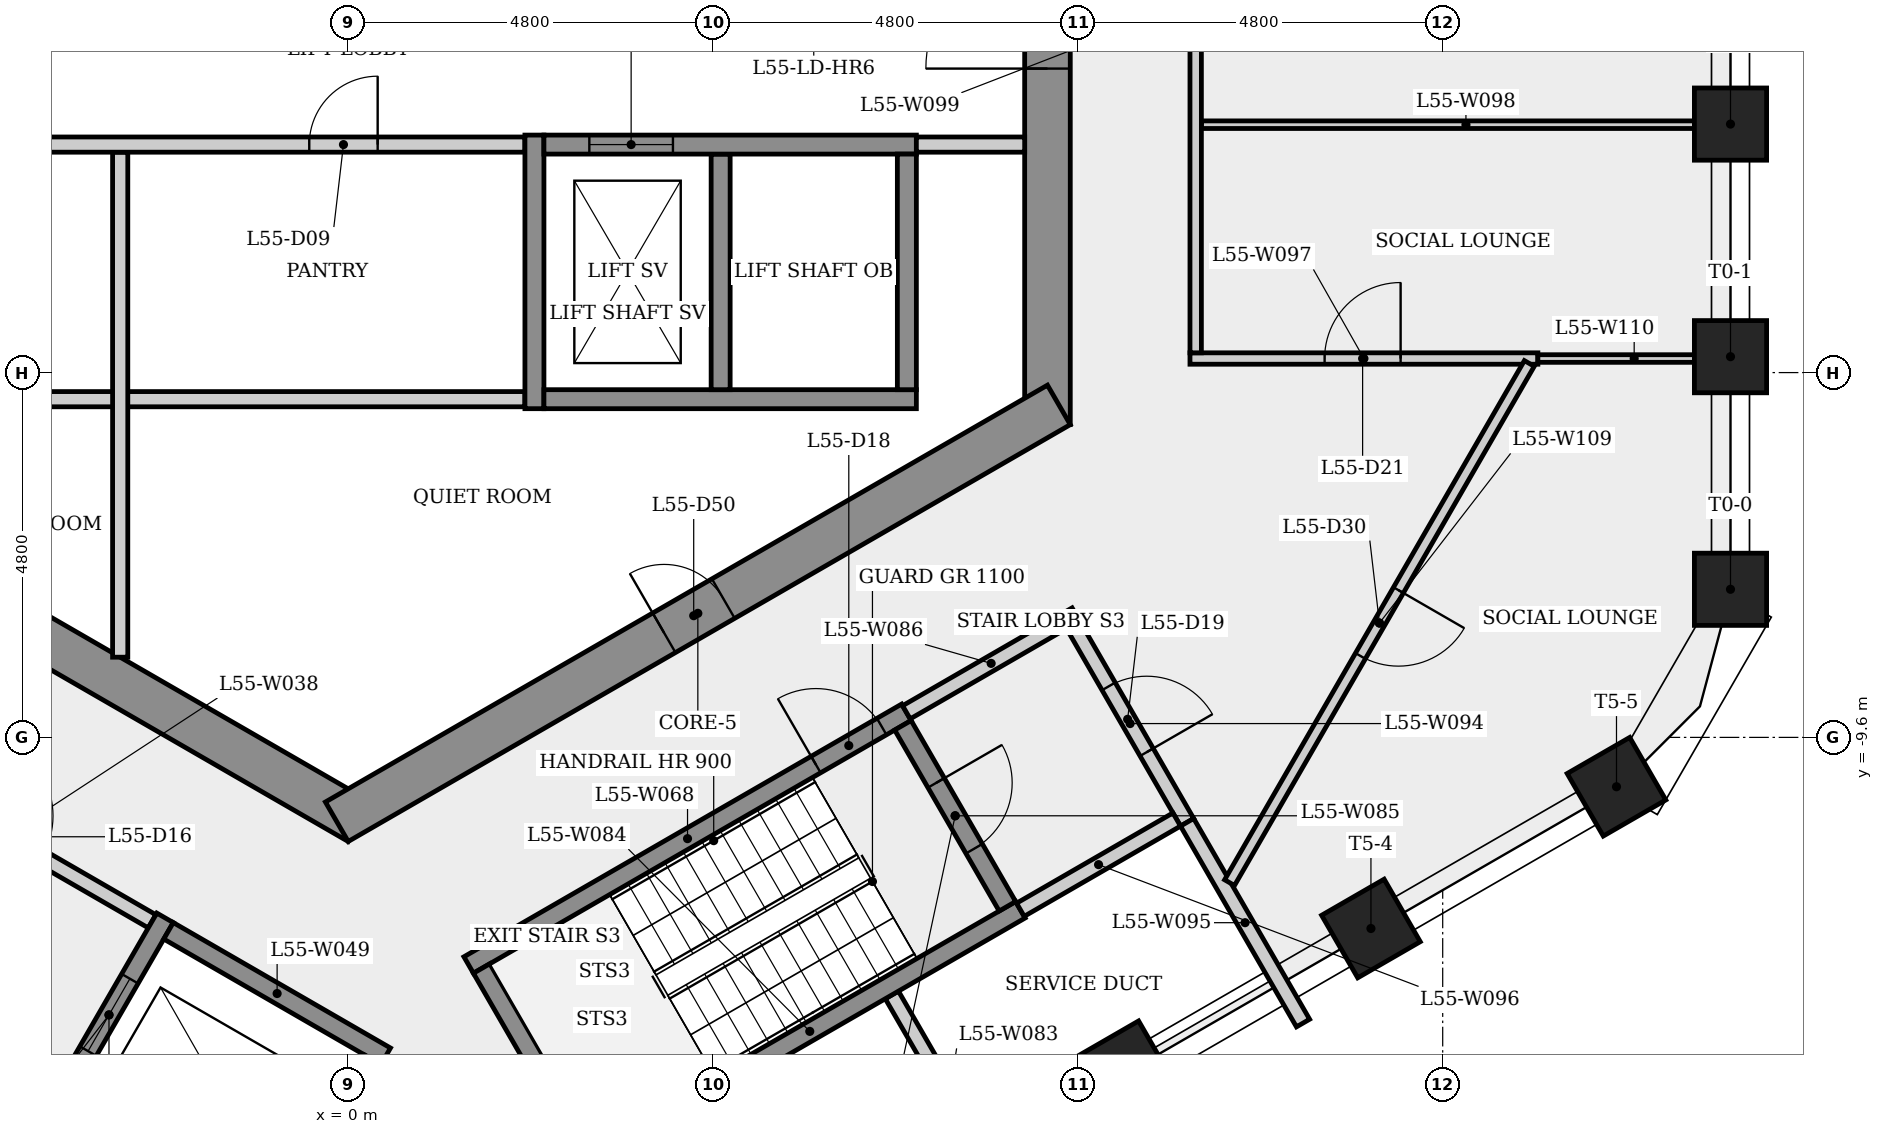
"""IFC4 building model, lengths in metres.
Left out: names, types, materials, properties, quantities, classifications, styles, units other than length and angle.
Written with IfcOpenShell. Run it as: python <this file> out.ifc"""

import sys

from ifc_helpers import new_model, si_unit, direction, frame, frame_2d, origin, origin_2d, place, context, subcontext, project, spatial, rectangle, extrude, element, fill, save


model = new_model("IFC4")
c1 = context("Model", 3, precision=1e-05, world=origin(), true_north=direction((0.0, 1.0)))
c2 = subcontext(c1, "Body", "Model", "MODEL_VIEW")
j1 = project(units=[si_unit("LENGTHUNIT", "METRE"), si_unit("PLANEANGLEUNIT", "RADIAN")], contexts=[c1])
p1 = place(None, origin())
s1 = spatial("IfcSite", under=j1, at=p1, CompositionType="ELEMENT")
p2 = place(p1, origin())
s2 = spatial("IfcBuilding", under=s1, at=p2, CompositionType="ELEMENT")
p3 = place(p2, frame((0.0, 0.0, 206.1)))
s3 = spatial("IfcBuildingStorey", under=s2, at=p3, CompositionType="ELEMENT", Elevation=206.1)
p4 = place(p3, frame((9.2, -5.485, 0.0), z_axis=(0.0, 0.0, 1.0), x_axis=(0.0, 1.0, 0.0)))
e1 = element("IfcWall", 1, at=p4, inside=s3, PredefinedType="SHEAR", context=c2, shape_type="SweptSolid", body=[
    extrude(rectangle(XDim=10.97, YDim=0.6, at=frame_2d((5.485, 0.0))), origin(), (0.0, 0.0, 1.0), 4.0),
])
p5 = place(p4, frame((4.685, 0.0, 0.0)))
e2 = element("IfcOpeningElement", 2, at=p5, cuts=e1, PredefinedType="OPENING", context=c2, shape_type="SweptSolid", body=[
    extrude(rectangle(XDim=1.6, YDim=2.1, at=frame_2d((0.8, 1.05))), frame((0.0, 0.31, 0.0), z_axis=(0.0, -1.0, 0.0), x_axis=(1.0, 0.0, 0.0)), (0.0, 0.0, 1.0), 0.62),
])
p6 = place(p3, frame((-9.35, -5.225, 0.0), z_axis=(0.0, 0.0, 1.0), x_axis=(0.866023993627, -0.500002442456, 0.0)))
e3 = element("IfcWall", 3, at=p6, inside=s3, PredefinedType="SHEAR", context=c2, shape_type="SweptSolid", body=[
    extrude(rectangle(XDim=10.97, YDim=0.6, at=frame_2d((5.485, 0.0))), origin(), (0.0, 0.0, 1.0), 4.0),
])
p7 = place(p6, frame((3.315, 0.0, 0.0)))
e4 = element("IfcOpeningElement", 4, at=p7, cuts=e3, PredefinedType="OPENING", context=c2, shape_type="SweptSolid", body=[
    extrude(rectangle(XDim=0.9, YDim=2.1, at=frame_2d((0.45, 1.05))), frame((0.0, 0.31, 0.0), z_axis=(0.0, -1.0, 0.0), x_axis=(1.0, 0.0, 0.0)), (0.0, 0.0, 1.0), 0.62),
])
p8 = place(p3, frame((-0.15, -10.71, 0.0), z_axis=(0.0, 0.0, 1.0), x_axis=(0.866023993627, 0.500002442456, 0.0)))
e5 = element("IfcWall", 5, at=p8, inside=s3, PredefinedType="SHEAR", context=c2, shape_type="SweptSolid", body=[
    extrude(rectangle(XDim=10.97, YDim=0.6, at=frame_2d((5.485, 0.0))), origin(), (0.0, 0.0, 1.0), 4.0),
])
p9 = place(p8, frame((4.972, 0.0, 0.0)))
e6 = element("IfcOpeningElement", 6, at=p9, cuts=e5, PredefinedType="OPENING", context=c2, shape_type="SweptSolid", body=[
    extrude(rectangle(XDim=0.9, YDim=2.1, at=frame_2d((0.45, 1.05))), frame((0.0, 0.31, 0.0), z_axis=(0.0, -1.0, 0.0), x_axis=(1.0, 0.0, 0.0)), (0.0, 0.0, 1.0), 0.62),
])
for number, where, z_axis, x_axis in (
    (7, (18.187, -7.651, 0.0), (0.0, 0.0, 1.0), (1.0, 0.0, 0.0)),
    (8, (18.187, -4.591, 0.0), (0.0, 0.0, 1.0), (1.0, 0.0, 0.0)),
    (9, (18.187, -1.53, 0.0), (0.0, 0.0, 1.0), (1.0, 0.0, 0.0)),
    (10, (10.225, -13.98, 0.0), (0.0, 0.0, 1.0), (0.5, -0.866, 0.0)),
    (11, (13.456, -12.115, 0.0), (0.0, 0.0, 1.0), (0.5, -0.866, 0.0)),
    (12, (16.687, -10.25, 0.0), (0.0, 0.0, 1.0), (0.5, -0.866, 0.0)),
):
    element("IfcColumn", number, at=place(p3, frame(where, z_axis=z_axis, x_axis=x_axis)), inside=s3, PredefinedType="COLUMN", context=c2, shape_type="SweptSolid", body=[
        extrude(rectangle(XDim=0.95, YDim=0.95, at=origin_2d()), origin(), (0.0, 0.0, 1.0), 4.0),
    ])
p10 = place(p3, frame((-8.88, -5.15, 0.0), z_axis=(0.0, 0.0, 1.0), x_axis=(1.0, 0.0, 0.0)))
e13 = element("IfcWall", 13, at=p10, inside=s3, PredefinedType="PARTITIONING", context=c2, shape_type="SweptSolid", body=[
    extrude(rectangle(XDim=11.205, YDim=0.2, at=frame_2d((5.603, 0.0))), origin(), (0.0, 0.0, 1.0), 3.6),
])
p11 = place(p3, frame((-6.435, -9.795, 0.0), z_axis=(0.0, 0.0, 1.0), x_axis=(0.866012907634, -0.500021643343, 0.0)))
e14 = element("IfcWall", 14, at=p11, inside=s3, PredefinedType="PARTITIONING", context=c2, shape_type="SweptSolid", body=[
    extrude(rectangle(XDim=4.45, YDim=0.2, at=frame_2d((2.225, 0.0))), origin(), (0.0, 0.0, 1.0), 3.6),
])
p12 = place(p11, frame((1.675, 0.0, 0.0)))
e15 = element("IfcOpeningElement", 15, at=p12, cuts=e14, PredefinedType="OPENING", context=c2, shape_type="SweptSolid", body=[
    extrude(rectangle(XDim=1.1, YDim=2.1, at=frame_2d((0.55, 1.05))), frame((0.0, 0.11, 0.0), z_axis=(0.0, -1.0, 0.0), x_axis=(1.0, 0.0, 0.0)), (0.0, 0.0, 1.0), 0.22),
])
p13 = place(p3, frame((-3.0, -8.545, 0.0), z_axis=(0.0, 0.0, 1.0), x_axis=(0.0, 1.0, 0.0)))
e16 = element("IfcWall", 16, at=p13, inside=s3, PredefinedType="PARTITIONING", context=c2, shape_type="SweptSolid", body=[
    extrude(rectangle(XDim=6.645, YDim=0.2, at=frame_2d((3.323, 0.0))), origin(), (0.0, 0.0, 1.0), 3.6),
])
p14 = place(p3, frame((-8.9, -1.8, 0.0), z_axis=(0.0, 0.0, 1.0), x_axis=(1.0, 0.0, 0.0)))
e17 = element("IfcWall", 17, at=p14, inside=s3, PredefinedType="PARTITIONING", context=c2, shape_type="SweptSolid", body=[
    extrude(rectangle(XDim=11.225, YDim=0.2, at=frame_2d((5.613, 0.0))), origin(), (0.0, 0.0, 1.0), 3.6),
])
p15 = place(p14, frame((2.485, 0.0, 0.0)))
e18 = element("IfcOpeningElement", 18, at=p15, cuts=e17, PredefinedType="OPENING", context=c2, shape_type="SweptSolid", body=[
    extrude(rectangle(XDim=0.9, YDim=2.1, at=frame_2d((0.45, 1.05))), frame((0.0, 0.11, 0.0), z_axis=(0.0, -1.0, 0.0), x_axis=(1.0, 0.0, 0.0)), (0.0, 0.0, 1.0), 0.22),
])
p16 = place(p14, frame((8.387, 0.0, 0.0)))
e19 = element("IfcOpeningElement", 19, at=p16, cuts=e17, PredefinedType="OPENING", context=c2, shape_type="SweptSolid", body=[
    extrude(rectangle(XDim=0.9, YDim=2.1, at=frame_2d((0.45, 1.05))), frame((0.0, 0.11, 0.0), z_axis=(0.0, -1.0, 0.0), x_axis=(1.0, 0.0, 0.0)), (0.0, 0.0, 1.0), 0.22),
])
p17 = place(p3, frame((-2.41, -11.974, 0.0), z_axis=(0.0, 0.0, 1.0), x_axis=(-0.500001826776, -0.866024349092, 0.0)))
e20 = element("IfcWall", 20, at=p17, inside=s3, PredefinedType="SHEAR", context=c2, shape_type="SweptSolid", body=[
    extrude(rectangle(XDim=2.95, YDim=0.25, at=frame_2d((1.475, 0.0))), origin(), (0.0, 0.0, 1.0), 3.6),
])
p18 = place(p17, frame((0.925, 0.0, 0.0)))
e21 = element("IfcOpeningElement", 21, at=p18, cuts=e20, PredefinedType="OPENING", context=c2, shape_type="SweptSolid", body=[
    extrude(rectangle(XDim=1.1, YDim=2.1, at=frame_2d((0.55, 1.05))), frame((0.0, 0.135, 0.0), z_axis=(0.0, -1.0, 0.0), x_axis=(1.0, 0.0, 0.0)), (0.0, 0.0, 1.0), 0.27),
])
p19 = place(p3, frame((-2.364, -12.145, 0.0), z_axis=(0.0, 0.0, 1.0), x_axis=(0.866040211805, -0.499974350878, 0.0)))
e22 = element("IfcWall", 22, at=p19, inside=s3, PredefinedType="SHEAR", context=c2, shape_type="SweptSolid", body=[
    extrude(rectangle(XDim=3.3, YDim=0.25, at=frame_2d((1.65, 0.0))), origin(), (0.0, 0.0, 1.0), 3.6),
])
p20 = place(p3, frame((1.585, -12.595, 0.0), z_axis=(0.0, 0.0, 1.0), x_axis=(0.866036417653, 0.499980922934, 0.0)))
e23 = element("IfcWall", 23, at=p20, inside=s3, PredefinedType="SHEAR", context=c2, shape_type="SweptSolid", body=[
    extrude(rectangle(XDim=6.65, YDim=0.25, at=frame_2d((3.325, 0.0))), origin(), (0.0, 0.0, 1.0), 3.6),
])
p21 = place(p20, frame((5.275, 0.0, 0.0)))
e24 = element("IfcOpeningElement", 24, at=p21, cuts=e23, PredefinedType="OPENING", context=c2, shape_type="SweptSolid", body=[
    extrude(rectangle(XDim=1.0, YDim=2.1, at=frame_2d((0.5, 1.05))), frame((0.0, 0.135, 0.0), z_axis=(0.0, -1.0, 0.0), x_axis=(1.0, 0.0, 0.0)), (0.0, 0.0, 1.0), 0.27),
])
p22 = place(p3, frame((2.45, -5.275, 0.0), z_axis=(0.0, 0.0, 1.0), x_axis=(0.0, 1.0, 0.0)))
e25 = element("IfcWall", 25, at=p22, inside=s3, PredefinedType="SHEAR", context=c2, shape_type="SweptSolid", body=[
    extrude(rectangle(XDim=3.6, YDim=0.25, at=frame_2d((1.8, 0.0))), origin(), (0.0, 0.0, 1.0), 3.6),
])
p23 = place(p3, frame((3.256, -15.239, 0.0), z_axis=(0.0, 0.0, 1.0), x_axis=(-0.50002537861, 0.866010750942, 0.0)))
e26 = element("IfcWall", 26, at=p23, inside=s3, PredefinedType="SHEAR", context=c2, shape_type="SweptSolid", body=[
    extrude(rectangle(XDim=3.0, YDim=0.25, at=frame_2d((1.5, 0.0))), origin(), (0.0, 0.0, 1.0), 3.6),
])
p24 = place(p3, frame((2.575, -5.15, 0.0), z_axis=(0.0, 0.0, 1.0), x_axis=(1.0, 0.0, 0.0)))
e27 = element("IfcWall", 27, at=p24, inside=s3, PredefinedType="SHEAR", context=c2, shape_type="SweptSolid", body=[
    extrude(rectangle(XDim=4.9, YDim=0.25, at=frame_2d((2.45, 0.0))), origin(), (0.0, 0.0, 1.0), 3.6),
])
p25 = place(p3, frame((4.9, -1.925, 0.0), z_axis=(0.0, 0.0, 1.0), x_axis=(0.0, -1.0, 0.0)))
e28 = element("IfcWall", 28, at=p25, inside=s3, PredefinedType="SHEAR", context=c2, shape_type="SweptSolid", body=[
    extrude(rectangle(XDim=3.1, YDim=0.25, at=frame_2d((1.55, 0.0))), origin(), (0.0, 0.0, 1.0), 4.0),
])
p26 = place(p3, frame((2.575, -1.8, 0.0), z_axis=(0.0, 0.0, 1.0), x_axis=(1.0, 0.0, 0.0)))
e29 = element("IfcWall", 29, at=p26, inside=s3, PredefinedType="SHEAR", context=c2, shape_type="SweptSolid", body=[
    extrude(rectangle(XDim=4.9, YDim=0.25, at=frame_2d((2.45, 0.0))), origin(), (0.0, 0.0, 1.0), 3.6),
])
p27 = place(p26, frame((0.597, 0.0, 0.0)))
e30 = element("IfcOpeningElement", 30, at=p27, cuts=e29, PredefinedType="OPENING", context=c2, shape_type="SweptSolid", body=[
    extrude(rectangle(XDim=1.1, YDim=2.1, at=frame_2d((0.55, 1.05))), frame((0.0, 0.135, 0.0), z_axis=(0.0, -1.0, 0.0), x_axis=(1.0, 0.0, 0.0)), (0.0, 0.0, 1.0), 0.27),
])
p28 = place(p3, frame((7.153, -12.989, 0.0), z_axis=(0.0, 0.0, 1.0), x_axis=(0.49999255039, -0.866029704776, 0.0)))
e31 = element("IfcWall", 31, at=p28, inside=s3, PredefinedType="PLUMBINGWALL", context=c2, shape_type="SweptSolid", body=[
    extrude(rectangle(XDim=3.025, YDim=0.2, at=frame_2d((1.513, 0.0))), origin(), (0.0, 0.0, 1.0), 3.6),
])
p29 = place(p3, frame((3.301, -15.068, 0.0), z_axis=(0.0, 0.0, 1.0), x_axis=(0.866035036182, 0.499983315828, 0.0)))
e32 = element("IfcWall", 32, at=p29, inside=s3, PredefinedType="SHEAR", context=c2, shape_type="SweptSolid", body=[
    extrude(rectangle(XDim=6.4, YDim=0.25, at=frame_2d((3.2, 0.0))), origin(), (0.0, 0.0, 1.0), 4.0),
])
p30 = place(p3, frame((7.298, -9.441, 0.0), z_axis=(0.0, 0.0, 1.0), x_axis=(0.500034990121, -0.866005201286, 0.0)))
e33 = element("IfcWall", 33, at=p30, inside=s3, PredefinedType="SHEAR", context=c2, shape_type="SweptSolid", body=[
    extrude(rectangle(XDim=2.75, YDim=0.25, at=frame_2d((1.375, 0.0))), origin(), (0.0, 0.0, 1.0), 3.6),
])
p31 = place(p30, frame((0.875, 0.0, 0.0)))
e34 = element("IfcOpeningElement", 34, at=p31, cuts=e33, PredefinedType="OPENING", context=c2, shape_type="SweptSolid", body=[
    extrude(rectangle(XDim=1.0, YDim=2.1, at=frame_2d((0.5, 1.05))), frame((0.0, 0.135, 0.0), z_axis=(0.0, -1.0, 0.0), x_axis=(1.0, 0.0, 0.0)), (0.0, 0.0, 1.0), 0.27),
])
p32 = place(p3, frame((7.344, -9.27, 0.0), z_axis=(0.0, 0.0, 1.0), x_axis=(0.866005588531, 0.500034319456, 0.0)))
e35 = element("IfcWall", 35, at=p32, inside=s3, PredefinedType="PARTITIONING", context=c2, shape_type="SweptSolid", body=[
    extrude(rectangle(XDim=2.575, YDim=0.2, at=frame_2d((1.288, 0.0))), origin(), (0.0, 0.0, 1.0), 3.6),
])
p33 = place(p3, frame((7.35, -1.925, 0.0), z_axis=(0.0, 0.0, 1.0), x_axis=(0.0, -1.0, 0.0)))
e36 = element("IfcWall", 36, at=p33, inside=s3, PredefinedType="SHEAR", context=c2, shape_type="SweptSolid", body=[
    extrude(rectangle(XDim=3.1, YDim=0.25, at=frame_2d((1.55, 0.0))), origin(), (0.0, 0.0, 1.0), 4.0),
])
p34 = place(p3, frame((8.9, -1.8, 0.0), z_axis=(0.0, 0.0, 1.0), x_axis=(-1.0, 0.0, 0.0)))
e37 = element("IfcWall", 37, at=p34, inside=s3, PredefinedType="PARTITIONING", context=c2, shape_type="SweptSolid", body=[
    extrude(rectangle(XDim=1.425, YDim=0.2, at=frame_2d((0.712, 0.0))), origin(), (0.0, 0.0, 1.0), 3.6),
])
p35 = place(p3, frame((9.537, -8.119, 0.0), z_axis=(0.0, 0.0, 1.0), x_axis=(0.499990139034, -0.866031096941, 0.0)))
e38 = element("IfcWall", 38, at=p35, inside=s3, PredefinedType="PARTITIONING", context=c2, shape_type="SweptSolid", body=[
    extrude(rectangle(XDim=3.0, YDim=0.2, at=frame_2d((1.5, 0.0))), origin(), (0.0, 0.0, 1.0), 3.6),
])
p36 = place(p35, frame((0.935, 0.0, 0.0)))
e39 = element("IfcOpeningElement", 39, at=p36, cuts=e38, PredefinedType="OPENING", context=c2, shape_type="SweptSolid", body=[
    extrude(rectangle(XDim=1.0, YDim=2.1, at=frame_2d((0.5, 1.05))), frame((0.0, 0.11, 0.0), z_axis=(0.0, -1.0, 0.0), x_axis=(1.0, 0.0, 0.0)), (0.0, 0.0, 1.0), 0.22),
])
p37 = place(p3, frame((11.037, -10.717, 0.0), z_axis=(0.0, 0.0, 1.0), x_axis=(0.500004207291, -0.86602297469, 0.0)))
e40 = element("IfcWall", 40, at=p37, inside=s3, PredefinedType="PLUMBINGWALL", context=c2, shape_type="SweptSolid", body=[
    extrude(rectangle(XDim=3.05, YDim=0.2, at=frame_2d((1.525, 0.0))), origin(), (0.0, 0.0, 1.0), 3.6),
])
p38 = place(p3, frame((10.901, -10.681, 0.0), z_axis=(0.0, 0.0, 1.0), x_axis=(-0.866007538022, -0.500030943131, 0.0)))
e41 = element("IfcWall", 41, at=p38, inside=s3, PredefinedType="PLUMBINGWALL", context=c2, shape_type="SweptSolid", body=[
    extrude(rectangle(XDim=2.375, YDim=0.2, at=frame_2d((1.188, 0.0))), origin(), (0.0, 0.0, 1.0), 3.6),
])
p39 = place(p3, frame((11.075, -4.615, 0.0), z_axis=(0.0, 0.0, 1.0), x_axis=(1.0, 0.0, 0.0)))
e42 = element("IfcWall", 42, at=p39, inside=s3, PredefinedType="PARTITIONING", context=c2, shape_type="SweptSolid", body=[
    extrude(rectangle(XDim=4.577, YDim=0.15, at=frame_2d((2.289, 0.0))), origin(), (0.0, 0.0, 1.0), 3.6),
])
p40 = place(p39, frame((1.771, 0.0, 0.0)))
e43 = element("IfcOpeningElement", 43, at=p40, cuts=e42, PredefinedType="OPENING", context=c2, shape_type="SweptSolid", body=[
    extrude(rectangle(XDim=1.0, YDim=2.1, at=frame_2d((0.5, 1.05))), frame((0.0, 0.085, 0.0), z_axis=(0.0, -1.0, 0.0), x_axis=(1.0, 0.0, 0.0)), (0.0, 0.0, 1.0), 0.17),
])
p41 = place(p3, frame((11.225, -1.538, 0.0), z_axis=(0.0, 0.0, 1.0), x_axis=(1.0, 0.0, 0.0)))
e44 = element("IfcWall", 44, at=p41, inside=s3, PredefinedType="PARTITIONING", context=c2, shape_type="SweptSolid", body=[
    extrude(rectangle(XDim=6.961, YDim=0.1, at=frame_2d((3.481, 0.0))), origin(), (0.0, 0.0, 1.0), 3.6),
])
p42 = place(p3, frame((11.15, -4.54, 0.0), z_axis=(0.0, 0.0, 1.0), x_axis=(0.0, 1.0, 0.0)))
e45 = element("IfcWall", 45, at=p42, inside=s3, PredefinedType="PARTITIONING", context=c2, shape_type="SweptSolid", body=[
    extrude(rectangle(XDim=9.23, YDim=0.15, at=frame_2d((4.615, 0.0))), origin(), (0.0, 0.0, 1.0), 3.6),
])
p43 = place(p42, frame((4.04, 0.0, 0.0)))
e46 = element("IfcOpeningElement", 46, at=p43, cuts=e45, PredefinedType="OPENING", context=c2, shape_type="SweptSolid", body=[
    extrude(rectangle(XDim=1.0, YDim=2.1, at=frame_2d((0.5, 1.05))), frame((0.0, 0.085, 0.0), z_axis=(0.0, -1.0, 0.0), x_axis=(1.0, 0.0, 0.0)), (0.0, 0.0, 1.0), 0.17),
])
p44 = place(p3, frame((15.54, -4.68, 0.0), z_axis=(0.0, 0.0, 1.0), x_axis=(-0.500017165488, -0.866015493058, 0.0)))
e47 = element("IfcWall", 47, at=p44, inside=s3, PredefinedType="PARTITIONING", context=c2, shape_type="SweptSolid", body=[
    extrude(rectangle(XDim=7.888, YDim=0.15, at=frame_2d((3.944, 0.0))), origin(), (0.0, 0.0, 1.0), 3.6),
])
p45 = place(p44, frame((3.444, 0.0, 0.0)))
e48 = element("IfcOpeningElement", 48, at=p45, cuts=e47, PredefinedType="OPENING", context=c2, shape_type="SweptSolid", body=[
    extrude(rectangle(XDim=1.0, YDim=2.1, at=frame_2d((0.5, 1.05))), frame((0.0, 0.085, 0.0), z_axis=(0.0, -1.0, 0.0), x_axis=(1.0, 0.0, 0.0)), (0.0, 0.0, 1.0), 0.17),
])
p46 = place(p3, frame((18.187, -4.615, 0.0), z_axis=(0.0, 0.0, 1.0), x_axis=(-1.0, 0.0, 0.0)))
e49 = element("IfcWall", 49, at=p46, inside=s3, PredefinedType="PARTITIONING", context=c2, shape_type="SweptSolid", body=[
    extrude(rectangle(XDim=2.534, YDim=0.1, at=frame_2d((1.267, 0.0))), origin(), (0.0, 0.0, 1.0), 3.6),
])
p47 = place(p27, origin())
e50 = element("IfcDoor", 50, at=p47, inside=s3, OperationType="SLIDING_TO_LEFT", PredefinedType="DOOR", context=c2, shape_type="SweptSolid", body=[
    extrude(rectangle(XDim=1.1, YDim=2.1, at=frame_2d((0.55, 1.05))), frame((0.0, 0.025, 0.0), z_axis=(0.0, -1.0, 0.0), x_axis=(1.0, 0.0, 0.0)), (0.0, 0.0, 1.0), 0.05),
])
fill(e30, e50)
p48 = place(p16, origin())
e51 = element("IfcDoor", 51, at=p48, inside=s3, OperationType="SINGLE_SWING_RIGHT", PredefinedType="DOOR", context=c2, shape_type="SweptSolid", body=[
    extrude(rectangle(XDim=0.9, YDim=2.1, at=frame_2d((0.45, 1.05))), frame((0.0, 0.025, 0.0), z_axis=(0.0, -1.0, 0.0), x_axis=(1.0, 0.0, 0.0)), (0.0, 0.0, 1.0), 0.05),
])
fill(e19, e51)
p49 = place(p18, origin())
e52 = element("IfcDoor", 52, at=p49, inside=s3, OperationType="SLIDING_TO_LEFT", PredefinedType="DOOR", context=c2, shape_type="SweptSolid", body=[
    extrude(rectangle(XDim=1.1, YDim=2.1, at=frame_2d((0.55, 1.05))), frame((0.0, 0.025, 0.0), z_axis=(0.0, -1.0, 0.0), x_axis=(1.0, 0.0, 0.0)), (0.0, 0.0, 1.0), 0.05),
])
fill(e21, e52)
p50 = place(p21, origin())
e53 = element("IfcDoor", 53, at=p50, inside=s3, OperationType="SINGLE_SWING_LEFT", PredefinedType="DOOR", context=c2, shape_type="SweptSolid", body=[
    extrude(rectangle(XDim=1.0, YDim=2.1, at=frame_2d((0.5, 1.05))), frame((0.0, 0.025, 0.0), z_axis=(0.0, -1.0, 0.0), x_axis=(1.0, 0.0, 0.0)), (0.0, 0.0, 1.0), 0.05),
])
fill(e24, e53)
p51 = place(p36, origin())
e54 = element("IfcDoor", 54, at=p51, inside=s3, OperationType="SINGLE_SWING_RIGHT", PredefinedType="DOOR", context=c2, shape_type="SweptSolid", body=[
    extrude(rectangle(XDim=1.0, YDim=2.1, at=frame_2d((0.5, 1.05))), frame((0.0, 0.025, 0.0), z_axis=(0.0, -1.0, 0.0), x_axis=(1.0, 0.0, 0.0)), (0.0, 0.0, 1.0), 0.05),
])
fill(e39, e54)
p52 = place(p31, origin())
e55 = element("IfcDoor", 55, at=p52, inside=s3, OperationType="SINGLE_SWING_LEFT", PredefinedType="DOOR", context=c2, shape_type="SweptSolid", body=[
    extrude(rectangle(XDim=1.0, YDim=2.1, at=frame_2d((0.5, 1.05))), frame((0.0, 0.025, 0.0), z_axis=(0.0, -1.0, 0.0), x_axis=(1.0, 0.0, 0.0)), (0.0, 0.0, 1.0), 0.05),
])
fill(e34, e55)
p53 = place(p40, origin())
e56 = element("IfcDoor", 56, at=p53, inside=s3, OperationType="SINGLE_SWING_RIGHT", PredefinedType="DOOR", context=c2, shape_type="SweptSolid", body=[
    extrude(rectangle(XDim=1.0, YDim=2.1, at=frame_2d((0.5, 1.05))), frame((0.0, 0.025, 0.0), z_axis=(0.0, -1.0, 0.0), x_axis=(1.0, 0.0, 0.0)), (0.0, 0.0, 1.0), 0.05),
])
fill(e43, e56)
p54 = place(p45, origin())
e57 = element("IfcDoor", 57, at=p54, inside=s3, OperationType="SINGLE_SWING_LEFT", PredefinedType="DOOR", context=c2, shape_type="SweptSolid", body=[
    extrude(rectangle(XDim=1.0, YDim=2.1, at=frame_2d((0.5, 1.05))), frame((0.0, 0.025, 0.0), z_axis=(0.0, -1.0, 0.0), x_axis=(1.0, 0.0, 0.0)), (0.0, 0.0, 1.0), 0.05),
])
fill(e48, e57)
p55 = place(p9, origin())
e58 = element("IfcDoor", 58, at=p55, inside=s3, OperationType="SINGLE_SWING_LEFT", PredefinedType="DOOR", context=c2, shape_type="SweptSolid", body=[
    extrude(rectangle(XDim=0.9, YDim=2.1, at=frame_2d((0.45, 1.05))), frame((0.0, 0.025, 0.0), z_axis=(0.0, -1.0, 0.0), x_axis=(1.0, 0.0, 0.0)), (0.0, 0.0, 1.0), 0.05),
])
fill(e6, e58)
p56 = place(p5, origin())
e59 = element("IfcDoor", 59, at=p56, inside=s3, OperationType="SINGLE_SWING_LEFT", PredefinedType="DOOR", context=c2, shape_type="SweptSolid", body=[
    extrude(rectangle(XDim=1.6, YDim=2.1, at=frame_2d((0.8, 1.05))), frame((0.0, 0.025, 0.0), z_axis=(0.0, -1.0, 0.0), x_axis=(1.0, 0.0, 0.0)), (0.0, 0.0, 1.0), 0.05),
])
fill(e2, e59)
save(model, sys.argv[1])
